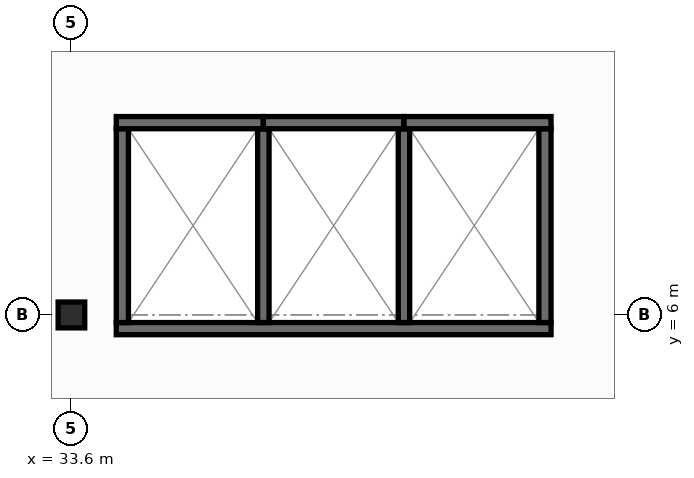
"""IFC4 building model, lengths in metres.
Left out: names, types, materials, properties, quantities, classifications, styles, units other than length and angle.
Written with IfcOpenShell. Run it as: python <this file> out.ifc"""

import sys

from ifc_helpers import new_model, si_unit, direction, frame, frame_2d, origin, origin_2d, place, context, subcontext, project, spatial, rectangle, i_section, extrude, element, save


model = new_model("IFC4")
c1 = context("Model", 3, precision=1e-05, world=origin(), true_north=direction((0.0, 1.0)))
c2 = subcontext(c1, "Body", "Model", "MODEL_VIEW")
j1 = project(units=[si_unit("LENGTHUNIT", "METRE"), si_unit("PLANEANGLEUNIT", "RADIAN")], contexts=[c1])
p1 = place(None, origin())
s1 = spatial("IfcSite", under=j1, at=p1, CompositionType="ELEMENT")
p2 = place(p1, origin())
s2 = spatial("IfcBuilding", under=s1, at=p2, CompositionType="ELEMENT")
p3 = place(p2, frame((0.0, 0.0, 38.3)))
s3 = spatial("IfcBuildingStorey", under=s2, at=p3, CompositionType="ELEMENT", Elevation=38.3)
p4 = place(p3, frame((33.6, 6.0, 0.0), z_axis=(0.0, 0.0, 1.0), x_axis=(1.0, 0.0, 0.0)))
e1 = element("IfcColumn", 1, at=p4, inside=s3, PredefinedType="COLUMN", context=c2, shape_type="SweptSolid", body=[
    extrude(i_section(OverallWidth=0.35, OverallDepth=0.34, WebThickness=0.016, FlangeThickness=0.028, at=origin_2d()), origin(), (0.0, 0.0, 1.0), 3.95),
])
p5 = place(p3, frame((34.19, 5.82, 0.0), z_axis=(0.0, 0.0, 1.0), x_axis=(1.0, 0.0, 0.0)))
e2 = element("IfcWall", 2, at=p5, inside=s3, PredefinedType="SHEAR", context=c2, shape_type="SweptSolid", body=[
    extrude(rectangle(XDim=5.72, YDim=0.16, at=frame_2d((2.86, 0.0))), origin(), (0.0, 0.0, 1.0), 3.71),
])
for number, where, z_axis, x_axis in (
    (3, (34.27, 5.9, 0.0), (0.0, 0.0, 1.0), (0.0, 1.0, 0.0)),
    (4, (39.83, 5.9, 0.0), (0.0, 0.0, 1.0), (0.0, 1.0, 0.0)),
):
    element("IfcWall", number, at=place(p3, frame(where, z_axis=z_axis, x_axis=x_axis)), inside=s3, PredefinedType="SHEAR", context=c2, shape_type="SweptSolid", body=[
        extrude(rectangle(XDim=2.55, YDim=0.16, at=frame_2d((1.275, 0.0))), origin(), (0.0, 0.0, 1.0), 3.71),
    ])
for number, where, z_axis, x_axis in (
    (5, (36.125, 5.9, 0.0), (0.0, 0.0, 1.0), (0.0, 1.0, 0.0)),
    (6, (37.975, 5.9, 0.0), (0.0, 0.0, 1.0), (0.0, 1.0, 0.0)),
):
    element("IfcWall", number, at=place(p3, frame(where, z_axis=z_axis, x_axis=x_axis)), inside=s3, PredefinedType="SHEAR", context=c2, shape_type="SweptSolid", body=[
        extrude(rectangle(XDim=2.55, YDim=0.15, at=frame_2d((1.275, 0.0))), origin(), (0.0, 0.0, 1.0), 3.71),
    ])
p6 = place(p3, frame((34.19, 8.53, 0.0), z_axis=(0.0, 0.0, 1.0), x_axis=(1.0, 0.0, 0.0)))
e7 = element("IfcWall", 7, at=p6, inside=s3, PredefinedType="SHEAR", context=c2, shape_type="SweptSolid", body=[
    extrude(rectangle(XDim=1.935, YDim=0.16, at=frame_2d((0.968, 0.0))), origin(), (0.0, 0.0, 1.0), 3.71),
])
p7 = place(p3, frame((36.125, 8.53, 0.0), z_axis=(0.0, 0.0, 1.0), x_axis=(1.0, 0.0, 0.0)))
e8 = element("IfcWall", 8, at=p7, inside=s3, PredefinedType="SHEAR", context=c2, shape_type="SweptSolid", body=[
    extrude(rectangle(XDim=1.85, YDim=0.16, at=frame_2d((0.925, 0.0))), origin(), (0.0, 0.0, 1.0), 3.71),
])
p8 = place(p3, frame((37.975, 8.53, 0.0), z_axis=(0.0, 0.0, 1.0), x_axis=(1.0, 0.0, 0.0)))
e9 = element("IfcWall", 9, at=p8, inside=s3, PredefinedType="SHEAR", context=c2, shape_type="SweptSolid", body=[
    extrude(rectangle(XDim=1.935, YDim=0.16, at=frame_2d((0.967, 0.0))), origin(), (0.0, 0.0, 1.0), 3.71),
])
save(model, sys.argv[1])
